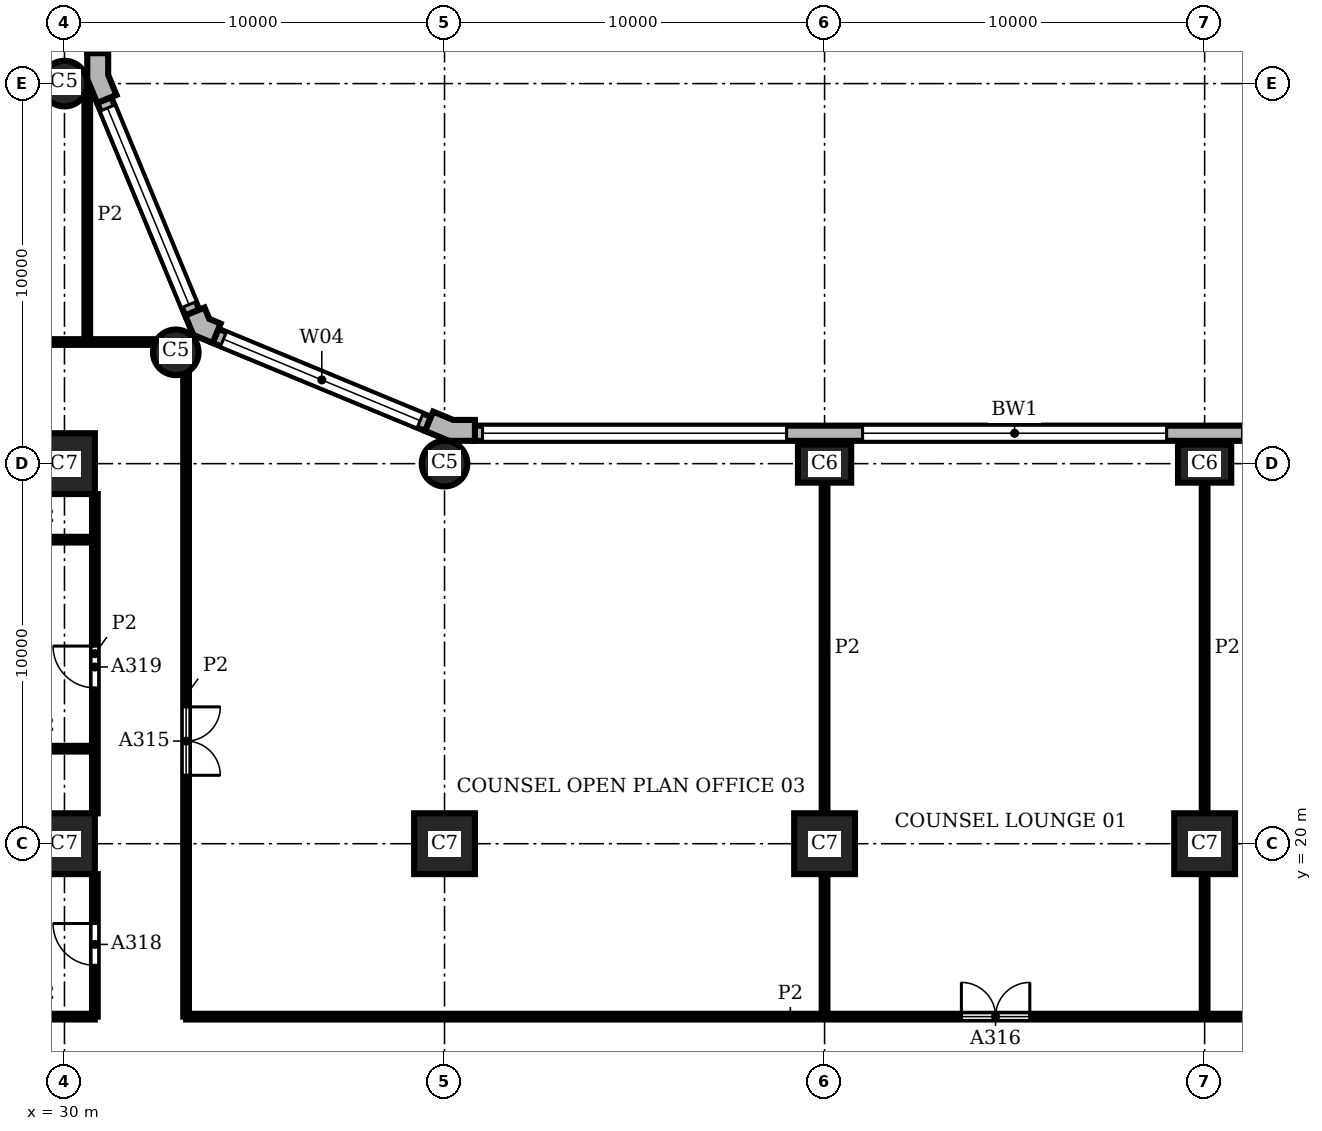
"""IFC4 building model, lengths in metres.
Left out: names, types, materials, properties, quantities, classifications, styles, units other than length and angle.
Written with IfcOpenShell. Run it as: python <this file> out.ifc"""

import sys

from ifc_helpers import new_model, si_unit, direction, frame, frame_2d, origin, origin_2d, place, context, subcontext, project, spatial, polyline, rectangle, circle, outline, extrude, element, fill, save


model = new_model("IFC4")
c1 = context("Model", 3, precision=1e-05, world=origin(), true_north=direction((0.0, 1.0)))
c2 = subcontext(c1, "Body", "Model", "MODEL_VIEW")
j1 = project(units=[si_unit("LENGTHUNIT", "METRE"), si_unit("PLANEANGLEUNIT", "RADIAN")], contexts=[c1])
p1 = place(None, origin())
s1 = spatial("IfcSite", under=j1, at=p1, CompositionType="ELEMENT")
p2 = place(p1, origin())
s2 = spatial("IfcBuilding", under=s1, at=p2, CompositionType="ELEMENT")
p3 = place(p2, frame((0.0, 0.0, 35.4)))
s3 = spatial("IfcBuildingStorey", under=s2, at=p3, CompositionType="ELEMENT", Elevation=35.4)
for number, where, z_axis, x_axis in (
    (1, (60.0, 30.0, 0.0), (0.0, 0.0, 1.0), (1.0, 0.0, 0.0)),
    (2, (50.0, 30.0, 0.0), (0.0, 0.0, 1.0), (1.0, 0.0, 0.0)),
):
    element("IfcColumn", number, at=place(p3, frame(where, z_axis=z_axis, x_axis=x_axis)), inside=s3, PredefinedType="COLUMN", context=c2, shape_type="SweptSolid", body=[
        extrude(rectangle(XDim=1.4, YDim=1.0, at=origin_2d()), origin(), (0.0, 0.0, 1.0), 3.9),
    ])
for number, where, z_axis, x_axis in (
    (3, (40.0, 30.0, 0.0), (0.0, 0.0, 1.0), (1.0, 0.0, 0.0)),
    (4, (32.929, 32.929, 0.0), (0.0, 0.0, 1.0), (1.0, 0.0, 0.0)),
    (5, (30.0, 40.0, 0.0), (0.0, 0.0, 1.0), (1.0, 0.0, 0.0)),
):
    element("IfcColumn", number, at=place(p3, frame(where, z_axis=z_axis, x_axis=x_axis)), inside=s3, PredefinedType="COLUMN", context=c2, shape_type="SweptSolid", body=[
        extrude(circle(Radius=0.6, at=origin_2d()), origin(), (0.0, 0.0, 1.0), 3.9),
    ])
for number, where, z_axis, x_axis in (
    (6, (30.0, 20.0, 0.0), (0.0, 0.0, 1.0), (1.0, 0.0, 0.0)),
    (7, (30.0, 30.0, 0.0), (0.0, 0.0, 1.0), (1.0, 0.0, 0.0)),
    (8, (40.0, 20.0, 0.0), (0.0, 0.0, 1.0), (1.0, 0.0, 0.0)),
    (9, (50.0, 20.0, 0.0), (0.0, 0.0, 1.0), (1.0, 0.0, 0.0)),
    (10, (60.0, 20.0, 0.0), (0.0, 0.0, 1.0), (1.0, 0.0, 0.0)),
):
    element("IfcColumn", number, at=place(p3, frame(where, z_axis=z_axis, x_axis=x_axis)), inside=s3, PredefinedType="COLUMN", context=c2, shape_type="SweptSolid", body=[
        extrude(rectangle(XDim=1.6, YDim=1.6, at=origin_2d()), origin(), (0.0, 0.0, 1.0), 3.9),
    ])
p4 = place(p3, origin())
e11 = element("IfcWall", 11, at=p4, inside=s3, PredefinedType="SOLIDWALL", context=c2, shape_type="SweptSolid", body=[
    extrude(outline(polyline([(40.8, 31.0), (40.8, 31.15), (40.229, 31.15), (39.701, 31.369), (39.644, 31.23), (39.49, 30.861), (40.119, 30.6), (40.8, 30.6), (40.8, 31.0)])), origin(), (0.0, 0.0, 1.0), 3.9),
])
e12 = element("IfcWall", 12, at=p4, inside=s3, PredefinedType="SOLIDWALL", context=c2, shape_type="SweptSolid", body=[
    extrude(outline(polyline([(34.051, 33.547), (34.108, 33.685), (33.809, 33.809), (33.685, 34.108), (33.547, 34.051), (33.177, 33.898), (33.388, 33.388), (33.898, 33.177), (34.051, 33.547)])), origin(), (0.0, 0.0, 1.0), 3.9),
])
e13 = element("IfcWall", 13, at=p4, inside=s3, PredefinedType="SOLIDWALL", context=c2, shape_type="SweptSolid", body=[
    extrude(outline(polyline([(31.23, 39.644), (31.369, 39.701), (31.15, 40.229), (31.15, 40.8), (31.0, 40.8), (30.6, 40.8), (30.6, 40.119), (30.861, 39.49), (31.23, 39.644)])), origin(), (0.0, 0.0, 1.0), 3.9),
])
p5 = place(p3, frame((69.2, 30.8, 0.0), z_axis=(0.0, 0.0, 1.0), x_axis=(-1.0, 0.0, 0.0)))
e14 = element("IfcWall", 14, at=p5, inside=s3, PredefinedType="SOLIDWALL", context=c2, shape_type="SweptSolid", body=[
    extrude(rectangle(XDim=28.4, YDim=0.4, at=frame_2d((14.2, 0.0))), origin(), (0.0, 0.0, 1.0), 3.9),
])
p6 = place(p5, frame((0.2, 0.0, 0.9)))
e15 = element("IfcOpeningElement", 15, at=p6, cuts=e14, PredefinedType="OPENING", context=c2, shape_type="SweptSolid", body=[
    extrude(rectangle(XDim=8.0, YDim=2.35, at=frame_2d((4.0, 1.175))), frame((0.0, 0.21, 0.0), z_axis=(0.0, -1.0, 0.0), x_axis=(1.0, 0.0, 0.0)), (0.0, 0.0, 1.0), 0.42),
])
p7 = place(p5, frame((10.2, 0.0, 0.9)))
e16 = element("IfcOpeningElement", 16, at=p7, cuts=e14, PredefinedType="OPENING", context=c2, shape_type="SweptSolid", body=[
    extrude(rectangle(XDim=8.0, YDim=2.35, at=frame_2d((4.0, 1.175))), frame((0.0, 0.21, 0.0), z_axis=(0.0, -1.0, 0.0), x_axis=(1.0, 0.0, 0.0)), (0.0, 0.0, 1.0), 0.42),
])
p8 = place(p5, frame((20.2, 0.0, 0.9)))
e17 = element("IfcOpeningElement", 17, at=p8, cuts=e14, PredefinedType="OPENING", context=c2, shape_type="SweptSolid", body=[
    extrude(rectangle(XDim=8.0, YDim=2.35, at=frame_2d((4.0, 1.175))), frame((0.0, 0.21, 0.0), z_axis=(0.0, -1.0, 0.0), x_axis=(1.0, 0.0, 0.0)), (0.0, 0.0, 1.0), 0.42),
])
p9 = place(p3, frame((39.567, 31.045, 0.0), z_axis=(0.0, 0.0, 1.0), x_axis=(-0.923891000409, 0.382655745237, 0.0)))
e18 = element("IfcWall", 18, at=p9, inside=s3, PredefinedType="SOLIDWALL", context=c2, shape_type="SweptSolid", body=[
    extrude(rectangle(XDim=6.053, YDim=0.4, at=frame_2d((3.027, 0.0))), origin(), (0.0, 0.0, 1.0), 3.9),
])
p10 = place(p9, frame((0.227, 0.0, 0.9)))
e19 = element("IfcOpeningElement", 19, at=p10, cuts=e18, PredefinedType="OPENING", context=c2, shape_type="SweptSolid", body=[
    extrude(rectangle(XDim=5.6, YDim=2.35, at=frame_2d((2.8, 1.175))), frame((0.0, 0.21, 0.0), z_axis=(0.0, -1.0, 0.0), x_axis=(1.0, 0.0, 0.0)), (0.0, 0.0, 1.0), 0.42),
])
p11 = place(p3, frame((33.362, 33.974, 0.0), z_axis=(0.0, 0.0, 1.0), x_axis=(-0.382655745237, 0.923891000409, 0.0)))
e20 = element("IfcWall", 20, at=p11, inside=s3, PredefinedType="SOLIDWALL", context=c2, shape_type="SweptSolid", body=[
    extrude(rectangle(XDim=6.053, YDim=0.4, at=frame_2d((3.027, 0.0))), origin(), (0.0, 0.0, 1.0), 3.9),
])
p12 = place(p11, frame((0.227, 0.0, 0.9)))
e21 = element("IfcOpeningElement", 21, at=p12, cuts=e20, PredefinedType="OPENING", context=c2, shape_type="SweptSolid", body=[
    extrude(rectangle(XDim=5.6, YDim=2.35, at=frame_2d((2.8, 1.175))), frame((0.0, 0.21, 0.0), z_axis=(0.0, -1.0, 0.0), x_axis=(1.0, 0.0, 0.0)), (0.0, 0.0, 1.0), 0.42),
])
p13 = place(p3, frame((30.8, 40.8, 0.0), z_axis=(0.0, 0.0, 1.0), x_axis=(0.0, 1.0, 0.0)))
e22 = element("IfcWall", 22, at=p13, inside=s3, PredefinedType="SOLIDWALL", context=c2, shape_type="SweptSolid", body=[
    extrude(rectangle(XDim=18.4, YDim=0.4, at=frame_2d((9.2, 0.0))), origin(), (0.0, 0.0, 1.0), 3.9),
])
p14 = place(p13, frame((0.2, 0.0, 0.9)))
e23 = element("IfcOpeningElement", 23, at=p14, cuts=e22, PredefinedType="OPENING", context=c2, shape_type="SweptSolid", body=[
    extrude(rectangle(XDim=8.0, YDim=2.35, at=frame_2d((4.0, 1.175))), frame((0.0, 0.21, 0.0), z_axis=(0.0, -1.0, 0.0), x_axis=(1.0, 0.0, 0.0)), (0.0, 0.0, 1.0), 0.42),
])
p15 = place(p13, frame((10.2, 0.0, 0.9)))
e24 = element("IfcOpeningElement", 24, at=p15, cuts=e22, PredefinedType="OPENING", context=c2, shape_type="SweptSolid", body=[
    extrude(rectangle(XDim=8.0, YDim=2.35, at=frame_2d((4.0, 1.175))), frame((0.0, 0.21, 0.0), z_axis=(0.0, -1.0, 0.0), x_axis=(1.0, 0.0, 0.0)), (0.0, 0.0, 1.0), 0.42),
])
p16 = place(p3, frame((30.6, 33.2, 0.0), z_axis=(0.0, 0.0, 1.0), x_axis=(0.0, 1.0, 0.0)))
e25 = element("IfcWall", 25, at=p16, inside=s3, PredefinedType="PARTITIONING", context=c2, shape_type="SweptSolid", body=[
    extrude(rectangle(XDim=6.699, YDim=0.15, at=frame_2d((3.35, 0.0))), origin(), (0.0, 0.0, 1.0), 3.58),
])
p17 = place(p3, frame((30.8, 15.45, 0.0), z_axis=(0.0, 0.0, 1.0), x_axis=(0.0, 1.0, 0.0)))
e26 = element("IfcWall", 26, at=p17, inside=s3, PredefinedType="PARTITIONING", context=c2, shape_type="SweptSolid", body=[
    extrude(rectangle(XDim=3.75, YDim=0.15, at=frame_2d((1.875, 0.0))), origin(), (0.0, 0.0, 1.0), 3.58),
])
p18 = place(p17, frame((1.35, 0.0, 0.0)))
e27 = element("IfcOpeningElement", 27, at=p18, cuts=e26, PredefinedType="OPENING", context=c2, shape_type="SweptSolid", body=[
    extrude(rectangle(XDim=1.1, YDim=2.1, at=frame_2d((0.55, 1.05))), frame((0.0, 0.085, 0.0), z_axis=(0.0, -1.0, 0.0), x_axis=(1.0, 0.0, 0.0)), (0.0, 0.0, 1.0), 0.17),
])
p19 = place(p3, frame((30.8, 20.8, 0.0), z_axis=(0.0, 0.0, 1.0), x_axis=(0.0, 1.0, 0.0)))
e28 = element("IfcWall", 28, at=p19, inside=s3, PredefinedType="PARTITIONING", context=c2, shape_type="SweptSolid", body=[
    extrude(rectangle(XDim=8.4, YDim=0.15, at=frame_2d((4.2, 0.0))), origin(), (0.0, 0.0, 1.0), 3.58),
])
p20 = place(p19, frame((3.3, 0.0, 0.0)))
e29 = element("IfcOpeningElement", 29, at=p20, cuts=e28, PredefinedType="OPENING", context=c2, shape_type="SweptSolid", body=[
    extrude(rectangle(XDim=1.1, YDim=2.1, at=frame_2d((0.55, 1.05))), frame((0.0, 0.085, 0.0), z_axis=(0.0, -1.0, 0.0), x_axis=(1.0, 0.0, 0.0)), (0.0, 0.0, 1.0), 0.17),
])
p21 = place(p3, frame((33.2, 15.45, 0.0), z_axis=(0.0, 0.0, 1.0), x_axis=(0.0, 1.0, 0.0)))
e30 = element("IfcWall", 30, at=p21, inside=s3, PredefinedType="PARTITIONING", context=c2, shape_type="SweptSolid", body=[
    extrude(rectangle(XDim=16.912, YDim=0.15, at=frame_2d((8.456, 0.0))), origin(), (0.0, 0.0, 1.0), 3.58),
])
p22 = place(p21, frame((6.35, 0.0, 0.0)))
e31 = element("IfcOpeningElement", 31, at=p22, cuts=e30, PredefinedType="OPENING", context=c2, shape_type="SweptSolid", body=[
    extrude(rectangle(XDim=1.8, YDim=2.1, at=frame_2d((0.9, 1.05))), frame((0.0, 0.085, 0.0), z_axis=(0.0, -1.0, 0.0), x_axis=(1.0, 0.0, 0.0)), (0.0, 0.0, 1.0), 0.17),
])
p23 = place(p3, frame((50.0, 15.45, 0.0), z_axis=(0.0, 0.0, 1.0), x_axis=(0.0, 1.0, 0.0)))
e32 = element("IfcWall", 32, at=p23, inside=s3, PredefinedType="PARTITIONING", context=c2, shape_type="SweptSolid", body=[
    extrude(rectangle(XDim=3.75, YDim=0.15, at=frame_2d((1.875, 0.0))), origin(), (0.0, 0.0, 1.0), 3.58),
])
p24 = place(p3, frame((50.0, 20.8, 0.0), z_axis=(0.0, 0.0, 1.0), x_axis=(0.0, 1.0, 0.0)))
e33 = element("IfcWall", 33, at=p24, inside=s3, PredefinedType="PARTITIONING", context=c2, shape_type="SweptSolid", body=[
    extrude(rectangle(XDim=8.7, YDim=0.15, at=frame_2d((4.35, 0.0))), origin(), (0.0, 0.0, 1.0), 3.58),
])
p25 = place(p3, frame((60.0, 15.45, 0.0), z_axis=(0.0, 0.0, 1.0), x_axis=(0.0, 1.0, 0.0)))
e34 = element("IfcWall", 34, at=p25, inside=s3, PredefinedType="PARTITIONING", context=c2, shape_type="SweptSolid", body=[
    extrude(rectangle(XDim=3.75, YDim=0.15, at=frame_2d((1.875, 0.0))), origin(), (0.0, 0.0, 1.0), 3.58),
])
p26 = place(p3, frame((60.0, 20.8, 0.0), z_axis=(0.0, 0.0, 1.0), x_axis=(0.0, 1.0, 0.0)))
e35 = element("IfcWall", 35, at=p26, inside=s3, PredefinedType="PARTITIONING", context=c2, shape_type="SweptSolid", body=[
    extrude(rectangle(XDim=8.7, YDim=0.15, at=frame_2d((4.35, 0.0))), origin(), (0.0, 0.0, 1.0), 3.58),
])
p27 = place(p3, frame((28.0, 15.45, 0.0), z_axis=(0.0, 0.0, 1.0), x_axis=(1.0, 0.0, 0.0)))
e36 = element("IfcWall", 36, at=p27, inside=s3, PredefinedType="PARTITIONING", context=c2, shape_type="SweptSolid", body=[
    extrude(rectangle(XDim=2.8, YDim=0.15, at=frame_2d((1.4, 0.0))), origin(), (0.0, 0.0, 1.0), 3.58),
])
p28 = place(p3, frame((33.2, 15.45, 0.0), z_axis=(0.0, 0.0, 1.0), x_axis=(1.0, 0.0, 0.0)))
e37 = element("IfcWall", 37, at=p28, inside=s3, PredefinedType="PARTITIONING", context=c2, shape_type="SweptSolid", body=[
    extrude(rectangle(XDim=31.8, YDim=0.15, at=frame_2d((15.9, 0.0))), origin(), (0.0, 0.0, 1.0), 3.58),
])
p29 = place(p28, frame((20.4, 0.0, 0.0)))
e38 = element("IfcOpeningElement", 38, at=p29, cuts=e37, PredefinedType="OPENING", context=c2, shape_type="SweptSolid", body=[
    extrude(rectangle(XDim=1.8, YDim=2.1, at=frame_2d((0.9, 1.05))), frame((0.0, 0.085, 0.0), z_axis=(0.0, -1.0, 0.0), x_axis=(1.0, 0.0, 0.0)), (0.0, 0.0, 1.0), 0.17),
])
for number, where, z_axis, x_axis in (
    (39, (28.0, 22.5, 0.0), (0.0, 0.0, 1.0), (1.0, 0.0, 0.0)),
    (40, (28.0, 28.0, 0.0), (0.0, 0.0, 1.0), (1.0, 0.0, 0.0)),
):
    element("IfcWall", number, at=place(p3, frame(where, z_axis=z_axis, x_axis=x_axis)), inside=s3, PredefinedType="PARTITIONING", context=c2, shape_type="SweptSolid", body=[
        extrude(rectangle(XDim=2.8, YDim=0.15, at=frame_2d((1.4, 0.0))), origin(), (0.0, 0.0, 1.0), 3.58),
    ])
p30 = place(p3, frame((16.5, 33.2, 0.0), z_axis=(0.0, 0.0, 1.0), x_axis=(1.0, 0.0, 0.0)))
e41 = element("IfcWall", 41, at=p30, inside=s3, PredefinedType="PARTITIONING", context=c2, shape_type="SweptSolid", body=[
    extrude(rectangle(XDim=15.862, YDim=0.15, at=frame_2d((7.931, 0.0))), origin(), (0.0, 0.0, 1.0), 3.58),
])
p31 = place(p30, frame((6.85, 0.0, 0.0)))
e42 = element("IfcOpeningElement", 42, at=p31, cuts=e41, PredefinedType="OPENING", context=c2, shape_type="SweptSolid", body=[
    extrude(rectangle(XDim=1.8, YDim=2.1, at=frame_2d((0.9, 1.05))), frame((0.0, 0.085, 0.0), z_axis=(0.0, -1.0, 0.0), x_axis=(1.0, 0.0, 0.0)), (0.0, 0.0, 1.0), 0.17),
])
p32 = place(p7, origin())
e43 = element("IfcWindow", 43, at=p32, inside=s3, PartitioningType="SINGLE_PANEL", PredefinedType="WINDOW", context=c2, shape_type="SweptSolid", body=[
    extrude(rectangle(XDim=8.0, YDim=2.35, at=frame_2d((4.0, 1.175))), frame((0.0, 0.16, 0.0), z_axis=(0.0, -1.0, 0.0), x_axis=(1.0, 0.0, 0.0)), (0.0, 0.0, 1.0), 0.06),
])
fill(e16, e43)
p33 = place(p8, origin())
e44 = element("IfcWindow", 44, at=p33, inside=s3, PartitioningType="SINGLE_PANEL", PredefinedType="WINDOW", context=c2, shape_type="SweptSolid", body=[
    extrude(rectangle(XDim=8.0, YDim=2.35, at=frame_2d((4.0, 1.175))), frame((0.0, 0.16, 0.0), z_axis=(0.0, -1.0, 0.0), x_axis=(1.0, 0.0, 0.0)), (0.0, 0.0, 1.0), 0.06),
])
fill(e17, e44)
p34 = place(p10, origin())
e45 = element("IfcWindow", 45, at=p34, inside=s3, PartitioningType="SINGLE_PANEL", PredefinedType="WINDOW", context=c2, shape_type="SweptSolid", body=[
    extrude(rectangle(XDim=5.6, YDim=2.35, at=frame_2d((2.8, 1.175))), frame((0.0, 0.16, 0.0), z_axis=(0.0, -1.0, 0.0), x_axis=(1.0, 0.0, 0.0)), (0.0, 0.0, 1.0), 0.06),
])
fill(e19, e45)
p35 = place(p12, origin())
e46 = element("IfcWindow", 46, at=p35, inside=s3, PartitioningType="SINGLE_PANEL", PredefinedType="WINDOW", context=c2, shape_type="SweptSolid", body=[
    extrude(rectangle(XDim=5.6, YDim=2.35, at=frame_2d((2.8, 1.175))), frame((0.0, 0.16, 0.0), z_axis=(0.0, -1.0, 0.0), x_axis=(1.0, 0.0, 0.0)), (0.0, 0.0, 1.0), 0.06),
])
fill(e21, e46)
p36 = place(p22, frame((1.8, 0.0, 0.0), z_axis=(0.0, 0.0, 1.0), x_axis=(-1.0, 0.0, 0.0)))
e47 = element("IfcDoor", 47, at=p36, inside=s3, OperationType="DOUBLE_DOOR_SINGLE_SWING", PredefinedType="DOOR", context=c2, shape_type="SweptSolid", body=[
    extrude(rectangle(XDim=1.8, YDim=2.1, at=frame_2d((0.9, 1.05))), frame((0.0, 0.025, 0.0), z_axis=(0.0, -1.0, 0.0), x_axis=(1.0, 0.0, 0.0)), (0.0, 0.0, 1.0), 0.05),
])
fill(e31, e47)
p37 = place(p29, origin())
e48 = element("IfcDoor", 48, at=p37, inside=s3, OperationType="DOUBLE_DOOR_SINGLE_SWING", PredefinedType="DOOR", context=c2, shape_type="SweptSolid", body=[
    extrude(rectangle(XDim=1.8, YDim=2.1, at=frame_2d((0.9, 1.05))), frame((0.0, 0.025, 0.0), z_axis=(0.0, -1.0, 0.0), x_axis=(1.0, 0.0, 0.0)), (0.0, 0.0, 1.0), 0.05),
])
fill(e38, e48)
p38 = place(p18, origin())
e49 = element("IfcDoor", 49, at=p38, inside=s3, OperationType="SINGLE_SWING_RIGHT", PredefinedType="DOOR", context=c2, shape_type="SweptSolid", body=[
    extrude(rectangle(XDim=1.1, YDim=2.1, at=frame_2d((0.55, 1.05))), frame((0.0, 0.025, 0.0), z_axis=(0.0, -1.0, 0.0), x_axis=(1.0, 0.0, 0.0)), (0.0, 0.0, 1.0), 0.05),
])
fill(e27, e49)
p39 = place(p20, origin())
e50 = element("IfcDoor", 50, at=p39, inside=s3, OperationType="SINGLE_SWING_RIGHT", PredefinedType="DOOR", context=c2, shape_type="SweptSolid", body=[
    extrude(rectangle(XDim=1.1, YDim=2.1, at=frame_2d((0.55, 1.05))), frame((0.0, 0.025, 0.0), z_axis=(0.0, -1.0, 0.0), x_axis=(1.0, 0.0, 0.0)), (0.0, 0.0, 1.0), 0.05),
])
fill(e29, e50)
save(model, sys.argv[1])
